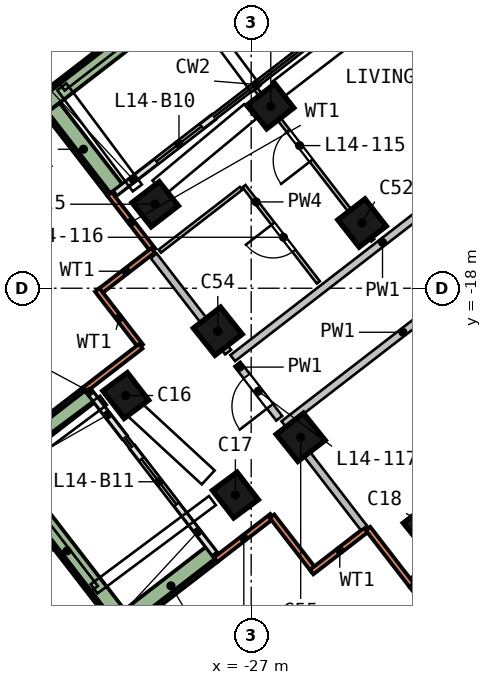
"""IFC4 building model, lengths in metres.
Left out: names, types, materials, properties, quantities, classifications, styles, units other than length and angle.
Written with IfcOpenShell. Run it as: python <this file> out.ifc"""

import sys

from ifc_helpers import new_model, si_unit, direction, frame, frame_2d, origin, origin_2d, place, context, subcontext, project, spatial, rectangle, extrude, element, fill, save


model = new_model("IFC4")
c1 = context("Model", 3, precision=1e-05, world=origin(), true_north=direction((0.0, 1.0)))
c2 = subcontext(c1, "Body", "Model", "MODEL_VIEW")
j1 = project(units=[si_unit("LENGTHUNIT", "METRE"), si_unit("PLANEANGLEUNIT", "RADIAN")], contexts=[c1])
p1 = place(None, origin())
s1 = spatial("IfcSite", under=j1, at=p1, CompositionType="ELEMENT")
p2 = place(p1, origin())
s2 = spatial("IfcBuilding", under=s1, at=p2, CompositionType="ELEMENT")
p3 = place(p2, frame((0.0, 0.0, 64.5)))
s3 = spatial("IfcBuildingStorey", under=s2, at=p3, CompositionType="ELEMENT", Elevation=64.5)
p4 = place(p3, frame((-26.613, -13.099, 0.0), z_axis=(0.105489502, -0.091772836, 0.990176606), x_axis=(-0.788757763, -0.614105882, 0.027113775)))
e1 = element("IfcColumn", 1, at=p4, inside=s3, PredefinedType="COLUMN", context=c2, shape_type="SweptSolid", body=[
    extrude(rectangle(XDim=0.9, YDim=0.8, at=origin_2d()), origin(), (0.0, 0.0, 1.0), 3.222),
])
p5 = place(p3, frame((-29.72, -15.701, 0.0), z_axis=(0.159373718, -0.072189136, 0.984575414), x_axis=(-0.781047677, -0.619192026, 0.08102938)))
e2 = element("IfcColumn", 2, at=p5, inside=s3, PredefinedType="COLUMN", context=c2, shape_type="SweptSolid", body=[
    extrude(rectangle(XDim=0.9, YDim=0.8, at=origin_2d()), origin(), (0.0, 0.0, 1.0), 3.24),
])
p6 = place(p3, frame((-30.523, -20.731, 0.0), z_axis=(0.182323085, -0.075405226, 0.980342973), x_axis=(0.588836559, -0.790110613, -0.17028425)))
e3 = element("IfcColumn", 3, at=p6, inside=s3, PredefinedType="COLUMN", context=c2, shape_type="SweptSolid", body=[
    extrude(rectangle(XDim=0.9, YDim=0.8, at=origin_2d()), origin(), (0.0, 0.0, 1.0), 3.254),
])
p7 = place(p3, frame((-27.654, -23.367, 0.0), z_axis=(0.194286462, -0.061740087, 0.978999965), x_axis=(0.587088324, -0.792221369, -0.166471026)))
e4 = element("IfcColumn", 4, at=p7, inside=s3, PredefinedType="COLUMN", context=c2, shape_type="SweptSolid", body=[
    extrude(rectangle(XDim=0.9, YDim=0.8, at=origin_2d()), origin(), (0.0, 0.0, 1.0), 3.258),
])
p8 = place(p3, frame((-22.624, -24.17, 0.0), z_axis=(0.197976725, -0.038156059, 0.979463798), x_axis=(0.771836187, 0.622015609, -0.131778159)))
e5 = element("IfcColumn", 5, at=p8, inside=s3, PredefinedType="COLUMN", context=c2, shape_type="SweptSolid", body=[
    extrude(rectangle(XDim=0.9, YDim=0.8, at=origin_2d()), origin(), (0.0, 0.0, 1.0), 3.257),
])
p9 = place(p3, frame((-24.229, -16.186, 0.0), z_axis=(0.119961103, -0.080277001, 0.989527633), x_axis=(-0.78658481, -0.615811024, 0.04539956)))
e6 = element("IfcColumn", 6, at=p9, inside=s3, PredefinedType="COLUMN", context=c2, shape_type="SweptSolid", body=[
    extrude(rectangle(XDim=0.9, YDim=0.9, at=origin_2d()), origin(), (0.0, 0.0, 1.0), 3.224),
])
p10 = place(p3, frame((-22.12, -18.916, 0.0), z_axis=(0.132646035, -0.070144252, 0.988678316), x_axis=(-0.784722381, -0.616786614, 0.061522818)))
e7 = element("IfcColumn", 7, at=p10, inside=s3, PredefinedType="COLUMN", context=c2, shape_type="SweptSolid", body=[
    extrude(rectangle(XDim=0.9, YDim=0.9, at=origin_2d()), origin(), (0.0, 0.0, 1.0), 3.227),
])
p11 = place(p3, frame((-28.093, -19.052, 0.0), z_axis=(0.174756282, -0.06421767, 0.982515309), x_axis=(-0.777890181, -0.620744984, 0.097788196)))
e8 = element("IfcColumn", 8, at=p11, inside=s3, PredefinedType="COLUMN", context=c2, shape_type="SweptSolid", body=[
    extrude(rectangle(XDim=0.9, YDim=0.9, at=origin_2d()), origin(), (0.0, 0.0, 1.0), 3.247),
])
p12 = place(p3, frame((-25.927, -21.856, 0.0), z_axis=(0.187509277, -0.053895781, 0.980783113), x_axis=(-0.775136818, -0.621414986, 0.114045294)))
e9 = element("IfcColumn", 9, at=p12, inside=s3, PredefinedType="COLUMN", context=c2, shape_type="SweptSolid", body=[
    extrude(rectangle(XDim=0.9, YDim=0.9, at=origin_2d()), origin(), (0.0, 0.0, 1.0), 3.252),
])
p13 = place(p3, frame((-30.727, -15.519, 0.0), z_axis=(0.0, 0.0, 1.0), x_axis=(0.61123253, -0.791451069, 0.0)))
e10 = element("IfcWall", 10, at=p13, inside=s3, PredefinedType="SOLIDWALL", context=c2, shape_type="SweptSolid", body=[
    extrude(rectangle(XDim=1.875, YDim=0.15, at=frame_2d((0.938, 0.0))), origin(), (0.0, 0.0, 1.0), 3.19),
])
p14 = place(p3, frame((-29.581, -17.002, 0.0), z_axis=(0.0, 0.0, 1.0), x_axis=(-0.791407282, -0.611289223, 0.0)))
e11 = element("IfcWall", 11, at=p14, inside=s3, PredefinedType="SOLIDWALL", context=c2, shape_type="SweptSolid", body=[
    extrude(rectangle(XDim=1.8, YDim=0.15, at=frame_2d((0.9, 0.0))), origin(), (0.0, 0.0, 1.0), 3.19),
])
for number, where, z_axis, x_axis in (
    (12, (-31.052, -18.043, 0.0), (0.0, 0.0, 1.0), (0.611, -0.791, 0.0)),
    (13, (-29.905, -19.527, 0.0), (0.0, 0.0, 1.0), (-0.791, -0.611, 0.0)),
    (14, (-27.936, -25.145, 0.0), (0.0, 0.0, 1.0), (0.791, 0.611, 0.0)),
):
    element("IfcWall", number, at=place(p3, frame(where, z_axis=z_axis, x_axis=x_axis)), inside=s3, PredefinedType="SOLIDWALL", context=c2, shape_type="SweptSolid", body=[
        extrude(rectangle(XDim=1.875, YDim=0.15, at=frame_2d((0.938, 0.0))), origin(), (0.0, 0.0, 1.0), 3.19),
    ])
p15 = place(p3, frame((-26.452, -23.999, 0.0), z_axis=(0.0, 0.0, 1.0), x_axis=(0.611204264, -0.791472898, 0.0)))
e15 = element("IfcWall", 15, at=p15, inside=s3, PredefinedType="SOLIDWALL", context=c2, shape_type="SweptSolid", body=[
    extrude(rectangle(XDim=1.8, YDim=0.15, at=frame_2d((0.9, 0.0))), origin(), (0.0, 0.0, 1.0), 3.19),
])
for number, where, z_axis, x_axis in (
    (16, (-25.411, -25.469, 0.0), (0.0, 0.0, 1.0), (0.791, 0.611, 0.0)),
    (17, (-23.927, -24.323, 0.0), (0.0, 0.0, 1.0), (0.611, -0.791, 0.0)),
):
    element("IfcWall", number, at=place(p3, frame(where, z_axis=z_axis, x_axis=x_axis)), inside=s3, PredefinedType="SOLIDWALL", context=c2, shape_type="SweptSolid", body=[
        extrude(rectangle(XDim=1.875, YDim=0.15, at=frame_2d((0.938, 0.0))), origin(), (0.0, 0.0, 1.0), 3.19),
    ])
p16 = place(p3, frame((-27.99, -13.499, 0.0), z_axis=(0.0, 0.0, 1.0), x_axis=(-0.791443298, -0.611242592, 0.0)))
e18 = element("IfcWall", 18, at=p16, inside=s3, PredefinedType="SOLIDWALL", context=c2, shape_type="SweptSolid", body=[
    extrude(rectangle(XDim=3.256, YDim=0.15, at=frame_2d((1.628, 0.0))), origin(), (0.0, 0.0, 1.0), 2.425),
])
p17 = place(p16, frame((0.4, 0.0, 0.0)))
e19 = element("IfcOpeningElement", 19, at=p17, cuts=e18, PredefinedType="OPENING", context=c2, shape_type="SweptSolid", body=[
    extrude(rectangle(XDim=1.5, YDim=2.4, at=frame_2d((0.75, 1.2))), frame((0.0, 0.085, 0.0), z_axis=(0.0, -1.0, 0.0), x_axis=(1.0, 0.0, 0.0)), (0.0, 0.0, 1.0), 0.17),
])
p18 = place(p3, frame((-30.129, -22.183, 0.0), z_axis=(0.0, 0.0, 1.0), x_axis=(0.611260485, -0.791429478, 0.0)))
e20 = element("IfcWall", 20, at=p18, inside=s3, PredefinedType="SOLIDWALL", context=c2, shape_type="SweptSolid", body=[
    extrude(rectangle(XDim=3.53, YDim=0.15, at=frame_2d((1.765, 0.0))), origin(), (0.0, 0.0, 1.0), 2.425),
])
p19 = place(p18, frame((0.4, 0.0, 0.0)))
e21 = element("IfcOpeningElement", 21, at=p19, cuts=e20, PredefinedType="OPENING", context=c2, shape_type="SweptSolid", body=[
    extrude(rectangle(XDim=1.5, YDim=2.4, at=frame_2d((0.75, 1.2))), frame((0.0, 0.085, 0.0), z_axis=(0.0, -1.0, 0.0), x_axis=(1.0, 0.0, 0.0)), (0.0, 0.0, 1.0), 0.17),
])
p20 = place(p3, frame((-31.235, -20.75, 0.0), z_axis=(0.0, 0.0, 1.0), x_axis=(0.611155759, -0.791510353, 0.0)))
e22 = element("IfcWall", 22, at=p20, inside=s3, PredefinedType="SOLIDWALL", context=c2, shape_type="SweptSolid", body=[
    extrude(rectangle(XDim=1.477, YDim=0.15, at=frame_2d((0.738, 0.0))), origin(), (0.0, 0.0, 1.0), 2.425),
])
p21 = place(p3, frame((-22.712, -25.659, 0.0), z_axis=(0.0, 0.0, 1.0), x_axis=(0.791436426, 0.61125149, 0.0)))
e23 = element("IfcWall", 23, at=p21, inside=s3, PredefinedType="SOLIDWALL", context=c2, shape_type="SweptSolid", body=[
    extrude(rectangle(XDim=3.864, YDim=0.15, at=frame_2d((1.932, 0.0))), origin(), (0.0, 0.0, 1.0), 2.425),
])
p22 = place(p21, frame((1.964, 0.0, 0.0)))
e24 = element("IfcOpeningElement", 24, at=p22, cuts=e23, PredefinedType="OPENING", context=c2, shape_type="SweptSolid", body=[
    extrude(rectangle(XDim=1.5, YDim=2.4, at=frame_2d((0.75, 1.2))), frame((0.0, 0.085, 0.0), z_axis=(0.0, -1.0, 0.0), x_axis=(1.0, 0.0, 0.0)), (0.0, 0.0, 1.0), 0.17),
])
p23 = place(p3, frame((-26.438, -8.478, 0.0), z_axis=(0.0, 0.0, 1.0), x_axis=(-0.791421051, -0.611271396, 0.0)))
e25 = element("IfcWall", 25, at=p23, inside=s3, PredefinedType="SOLIDWALL", context=c2, shape_type="SweptSolid", body=[
    extrude(rectangle(XDim=7.773, YDim=0.5, at=frame_2d((3.887, 0.0))), origin(), (0.0, 0.0, 1.0), 0.7),
])
p24 = place(p3, frame((-32.239, -13.275, 0.0), z_axis=(0.0, 0.0, 1.0), x_axis=(0.61125699, -0.791432178, 0.0)))
e26 = element("IfcWall", 26, at=p24, inside=s3, PredefinedType="SOLIDWALL", context=c2, shape_type="SweptSolid", body=[
    extrude(rectangle(XDim=2.699, YDim=0.5, at=frame_2d((1.35, 0.0))), origin(), (0.0, 0.0, 1.0), 0.7),
])
p25 = place(p3, frame((-31.283, -20.812, 0.0), z_axis=(0.0, 0.0, 1.0), x_axis=(-0.791439394, -0.611247647, 0.0)))
e27 = element("IfcWall", 27, at=p25, inside=s3, PredefinedType="SOLIDWALL", context=c2, shape_type="SweptSolid", body=[
    extrude(rectangle(XDim=3.199, YDim=0.5, at=frame_2d((1.6, 0.0))), origin(), (0.0, 0.0, 1.0), 0.7),
])
p26 = place(p3, frame((-33.464, -22.813, 0.0), z_axis=(0.0, 0.0, 1.0), x_axis=(0.611267878, -0.791423769, 0.0)))
e28 = element("IfcWall", 28, at=p26, inside=s3, PredefinedType="SOLIDWALL", context=c2, shape_type="SweptSolid", body=[
    extrude(rectangle(XDim=5.3, YDim=0.5, at=frame_2d((2.65, 0.0))), origin(), (0.0, 0.0, 1.0), 0.7),
])
p27 = place(p3, frame((-30.179, -26.657, 0.0), z_axis=(0.0, 0.0, 1.0), x_axis=(0.791398379, 0.611300748, 0.0)))
e29 = element("IfcWall", 29, at=p27, inside=s3, PredefinedType="SOLIDWALL", context=c2, shape_type="SweptSolid", body=[
    extrude(rectangle(XDim=2.699, YDim=0.5, at=frame_2d((1.35, 0.0))), origin(), (0.0, 0.0, 1.0), 0.7),
])
p28 = place(p3, frame((-22.642, -25.701, 0.0), z_axis=(0.0, 0.0, 1.0), x_axis=(0.611247647, -0.791439394, 0.0)))
e30 = element("IfcWall", 30, at=p28, inside=s3, PredefinedType="SOLIDWALL", context=c2, shape_type="SweptSolid", body=[
    extrude(rectangle(XDim=3.199, YDim=0.5, at=frame_2d((1.6, 0.0))), origin(), (0.0, 0.0, 1.0), 0.7),
])
p29 = place(p3, frame((-26.262, -21.423, 0.0), z_axis=(0.0, 0.0, 1.0), x_axis=(-0.611285723, 0.791409986, 0.0)))
e31 = element("IfcWall", 31, at=p29, inside=s3, PredefinedType="SOLIDWALL", context=c2, shape_type="SweptSolid", body=[
    extrude(rectangle(XDim=1.804, YDim=0.2, at=frame_2d((0.902, 0.0))), origin(), (0.0, 0.0, 1.0), 3.19),
])
p30 = place(p29, frame((0.4, 0.0, 0.0)))
e32 = element("IfcOpeningElement", 32, at=p30, cuts=e31, PredefinedType="OPENING", context=c2, shape_type="SweptSolid", body=[
    extrude(rectangle(XDim=1.0, YDim=2.1, at=frame_2d((0.5, 1.05))), frame((0.0, 0.11, 0.0), z_axis=(0.0, -1.0, 0.0), x_axis=(1.0, 0.0, 0.0)), (0.0, 0.0, 1.0), 0.22),
])
p31 = place(p3, frame((-27.486, -19.838, 0.0), z_axis=(0.0, 0.0, 1.0), x_axis=(0.791431192, 0.611258267, 0.0)))
e33 = element("IfcWall", 33, at=p31, inside=s3, PredefinedType="SOLIDWALL", context=c2, shape_type="SweptSolid", body=[
    extrude(rectangle(XDim=16.121, YDim=0.2, at=frame_2d((8.061, 0.0))), origin(), (0.0, 0.0, 1.0), 3.19),
])
p32 = place(p31, frame((10.16, 0.0, 0.0)))
e34 = element("IfcOpeningElement", 34, at=p32, cuts=e33, PredefinedType="OPENING", context=c2, shape_type="SweptSolid", body=[
    extrude(rectangle(XDim=1.0, YDim=2.1, at=frame_2d((0.5, 1.05))), frame((0.0, 0.11, 0.0), z_axis=(0.0, -1.0, 0.0), x_axis=(1.0, 0.0, 0.0)), (0.0, 0.0, 1.0), 0.22),
])
p33 = place(p3, frame((-13.541, -11.848, 0.0), z_axis=(0.0, 0.0, 1.0), x_axis=(-0.791435051, -0.611253271, 0.0)))
e35 = element("IfcWall", 35, at=p33, inside=s3, PredefinedType="SOLIDWALL", context=c2, shape_type="SweptSolid", body=[
    extrude(rectangle(XDim=15.921, YDim=0.2, at=frame_2d((7.96, 0.0))), origin(), (0.0, 0.0, 1.0), 3.19),
])
p34 = place(p33, frame((6.8, 0.0, 0.0)))
e36 = element("IfcOpeningElement", 36, at=p34, cuts=e35, PredefinedType="OPENING", context=c2, shape_type="SweptSolid", body=[
    extrude(rectangle(XDim=1.0, YDim=2.1, at=frame_2d((0.5, 1.05))), frame((0.0, 0.11, 0.0), z_axis=(0.0, -1.0, 0.0), x_axis=(1.0, 0.0, 0.0)), (0.0, 0.0, 1.0), 0.22),
])
p35 = place(p3, frame((-29.565, -17.146, 0.0), z_axis=(0.0, 0.0, 1.0), x_axis=(0.611278328, -0.791415697, 0.0)))
e37 = element("IfcWall", 37, at=p35, inside=s3, PredefinedType="SOLIDWALL", context=c2, shape_type="SweptSolid", body=[
    extrude(rectangle(XDim=3.204, YDim=0.2, at=frame_2d((1.602, 0.0))), origin(), (0.0, 0.0, 1.0), 3.19),
])
p36 = place(p3, frame((-26.02, -21.736, 0.0), z_axis=(0.0, 0.0, 1.0), x_axis=(0.611302205, -0.791397254, 0.0)))
e38 = element("IfcWall", 38, at=p36, inside=s3, PredefinedType="SOLIDWALL", context=c2, shape_type="SweptSolid", body=[
    extrude(rectangle(XDim=3.252, YDim=0.2, at=frame_2d((1.626, 0.0))), origin(), (0.0, 0.0, 1.0), 3.19),
])
p37 = place(p3, frame((-27.269, -15.375, 0.0), z_axis=(0.0, 0.0, 1.0), x_axis=(-0.791446045, -0.611239034, 0.0)))
e39 = element("IfcWall", 39, at=p37, inside=s3, PredefinedType="PARTITIONING", context=c2, shape_type="SweptSolid", body=[
    extrude(rectangle(XDim=2.7, YDim=0.1, at=frame_2d((1.35, 0.0))), origin(), (0.0, 0.0, 1.0), 3.19),
])
p38 = place(p3, frame((-25.234, -17.846, 0.0), z_axis=(0.0, 0.0, 1.0), x_axis=(-0.61124338, 0.791442689, 0.0)))
e40 = element("IfcWall", 40, at=p38, inside=s3, PredefinedType="PARTITIONING", context=c2, shape_type="SweptSolid", body=[
    extrude(rectangle(XDim=3.2, YDim=0.1, at=frame_2d((1.6, 0.0))), origin(), (0.0, 0.0, 1.0), 3.19),
])
p39 = place(p38, frame((1.05, 0.0, 0.0)))
e41 = element("IfcOpeningElement", 41, at=p39, cuts=e40, PredefinedType="OPENING", context=c2, shape_type="SweptSolid", body=[
    extrude(rectangle(XDim=0.9, YDim=2.1, at=frame_2d((0.45, 1.05))), frame((0.0, 0.06, 0.0), z_axis=(0.0, -1.0, 0.0), x_axis=(1.0, 0.0, 0.0)), (0.0, 0.0, 1.0), 0.12),
])
p40 = place(p3, frame((-23.801, -16.74, 0.0), z_axis=(0.0, 0.0, 1.0), x_axis=(-0.611256235, 0.791432761, 0.0)))
e42 = element("IfcWall", 42, at=p40, inside=s3, PredefinedType="PARTITIONING", context=c2, shape_type="SweptSolid", body=[
    extrude(rectangle(XDim=5.05, YDim=0.1, at=frame_2d((2.525, 0.0))), origin(), (0.0, 0.0, 1.0), 3.19),
])
p41 = place(p40, frame((2.65, 0.0, 0.0)))
e43 = element("IfcOpeningElement", 43, at=p41, cuts=e42, PredefinedType="OPENING", context=c2, shape_type="SweptSolid", body=[
    extrude(rectangle(XDim=1.0, YDim=2.1, at=frame_2d((0.5, 1.05))), frame((0.0, 0.06, 0.0), z_axis=(0.0, -1.0, 0.0), x_axis=(1.0, 0.0, 0.0)), (0.0, 0.0, 1.0), 0.12),
])
p42 = place(p17, origin())
e44 = element("IfcDoor", 44, at=p42, inside=s3, OperationType="SLIDING_TO_RIGHT", PredefinedType="DOOR", context=c2, shape_type="SweptSolid", body=[
    extrude(rectangle(XDim=1.5, YDim=2.4, at=frame_2d((0.75, 1.2))), frame((0.0, 0.025, 0.0), z_axis=(0.0, -1.0, 0.0), x_axis=(1.0, 0.0, 0.0)), (0.0, 0.0, 1.0), 0.05),
])
fill(e19, e44)
p43 = place(p19, origin())
e45 = element("IfcDoor", 45, at=p43, inside=s3, OperationType="SLIDING_TO_RIGHT", PredefinedType="DOOR", context=c2, shape_type="SweptSolid", body=[
    extrude(rectangle(XDim=1.5, YDim=2.4, at=frame_2d((0.75, 1.2))), frame((0.0, 0.025, 0.0), z_axis=(0.0, -1.0, 0.0), x_axis=(1.0, 0.0, 0.0)), (0.0, 0.0, 1.0), 0.05),
])
fill(e21, e45)
p44 = place(p41, origin())
e46 = element("IfcDoor", 46, at=p44, inside=s3, OperationType="SINGLE_SWING_LEFT", PredefinedType="DOOR", context=c2, shape_type="SweptSolid", body=[
    extrude(rectangle(XDim=1.0, YDim=2.1, at=frame_2d((0.5, 1.05))), frame((0.0, 0.025, 0.0), z_axis=(0.0, -1.0, 0.0), x_axis=(1.0, 0.0, 0.0)), (0.0, 0.0, 1.0), 0.05),
])
fill(e43, e46)
p45 = place(p39, origin())
e47 = element("IfcDoor", 47, at=p45, inside=s3, OperationType="SINGLE_SWING_RIGHT", PredefinedType="DOOR", context=c2, shape_type="SweptSolid", body=[
    extrude(rectangle(XDim=0.9, YDim=2.1, at=frame_2d((0.45, 1.05))), frame((0.0, 0.025, 0.0), z_axis=(0.0, -1.0, 0.0), x_axis=(1.0, 0.0, 0.0)), (0.0, 0.0, 1.0), 0.05),
])
fill(e41, e47)
p46 = place(p30, origin())
e48 = element("IfcDoor", 48, at=p46, inside=s3, OperationType="SINGLE_SWING_LEFT", PredefinedType="DOOR", context=c2, shape_type="SweptSolid", body=[
    extrude(rectangle(XDim=1.0, YDim=2.1, at=frame_2d((0.5, 1.05))), frame((0.0, 0.025, 0.0), z_axis=(0.0, -1.0, 0.0), x_axis=(1.0, 0.0, 0.0)), (0.0, 0.0, 1.0), 0.05),
])
fill(e32, e48)
save(model, sys.argv[1])
